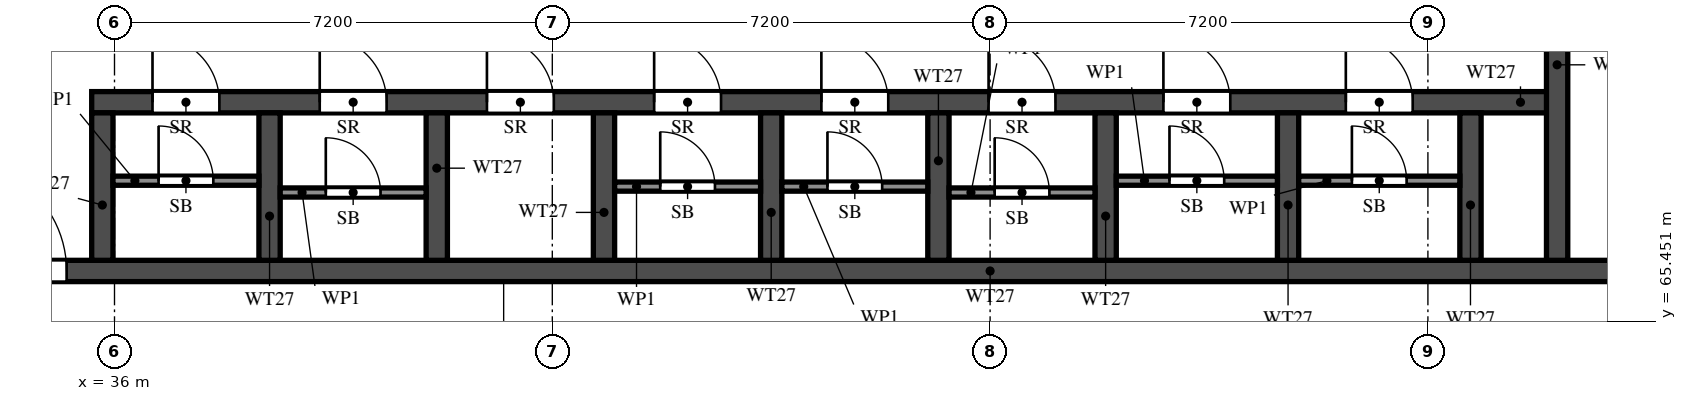
"""IFC4 building model, lengths in metres.
Left out: names, types, materials, properties, quantities, classifications, styles, units other than length and angle.
Written with IfcOpenShell. Run it as: python <this file> out.ifc"""

import sys

from ifc_helpers import new_model, si_unit, direction, frame, frame_2d, origin, place, context, subcontext, project, spatial, rectangle, extrude, element, fill, save


model = new_model("IFC4")
c1 = context("Model", 3, precision=1e-05, world=origin(), true_north=direction((0.0, 1.0)))
c2 = subcontext(c1, "Body", "Model", "MODEL_VIEW")
j1 = project(units=[si_unit("LENGTHUNIT", "METRE"), si_unit("PLANEANGLEUNIT", "RADIAN")], contexts=[c1])
p1 = place(None, origin())
s1 = spatial("IfcSite", under=j1, at=p1, CompositionType="ELEMENT")
p2 = place(p1, origin())
s2 = spatial("IfcBuilding", under=s1, at=p2, CompositionType="ELEMENT")
p3 = place(p2, frame((0.0, 0.0, 150.0)))
s3 = spatial("IfcBuildingStorey", under=s2, at=p3, CompositionType="ELEMENT", Elevation=150.0)
p4 = place(p3, frame((29.7, 66.275, 0.0), z_axis=(0.0, 0.0, 1.0), x_axis=(1.0, 0.0, 0.0)))
e1 = element("IfcWall", 1, at=p4, inside=s3, PredefinedType="SHEAR", context=c2, shape_type="SweptSolid", body=[
    extrude(rectangle(XDim=41.4, YDim=0.35, at=frame_2d((20.7, 0.0))), origin(), (0.0, 0.0, 1.0), 3.2),
])
p5 = place(p4, frame((0.925, 0.0, 0.0)))
e2 = element("IfcOpeningElement", 2, at=p5, cuts=e1, PredefinedType="OPENING", context=c2, shape_type="SweptSolid", body=[
    extrude(rectangle(XDim=1.1, YDim=2.1, at=frame_2d((0.55, 1.05))), frame((0.0, 0.185, 0.0), z_axis=(0.0, -1.0, 0.0), x_axis=(1.0, 0.0, 0.0)), (0.0, 0.0, 1.0), 0.37),
])
p6 = place(p4, frame((3.712, 0.0, 0.0)))
e3 = element("IfcOpeningElement", 3, at=p6, cuts=e1, PredefinedType="OPENING", context=c2, shape_type="SweptSolid", body=[
    extrude(rectangle(XDim=1.8, YDim=2.1, at=frame_2d((0.9, 1.05))), frame((0.0, 0.185, 0.0), z_axis=(0.0, -1.0, 0.0), x_axis=(1.0, 0.0, 0.0)), (0.0, 0.0, 1.0), 0.37),
])
p7 = place(p3, frame((35.625, 69.05, 0.0), z_axis=(0.0, 0.0, 1.0), x_axis=(1.0, 0.0, 0.0)))
e4 = element("IfcWall", 4, at=p7, inside=s3, PredefinedType="SHEAR", context=c2, shape_type="SweptSolid", body=[
    extrude(rectangle(XDim=24.1, YDim=0.35, at=frame_2d((12.05, 0.0))), origin(), (0.0, 0.0, 1.0), 3.2),
])
p8 = place(p7, frame((1.0, 0.0, 0.0)))
e5 = element("IfcOpeningElement", 5, at=p8, cuts=e4, PredefinedType="OPENING", context=c2, shape_type="SweptSolid", body=[
    extrude(rectangle(XDim=1.1, YDim=2.1, at=frame_2d((0.55, 1.05))), frame((0.0, 0.185, 0.0), z_axis=(0.0, -1.0, 0.0), x_axis=(1.0, 0.0, 0.0)), (0.0, 0.0, 1.0), 0.37),
])
p9 = place(p7, frame((3.75, 0.0, 0.0)))
e6 = element("IfcOpeningElement", 6, at=p9, cuts=e4, PredefinedType="OPENING", context=c2, shape_type="SweptSolid", body=[
    extrude(rectangle(XDim=1.1, YDim=2.1, at=frame_2d((0.55, 1.05))), frame((0.0, 0.185, 0.0), z_axis=(0.0, -1.0, 0.0), x_axis=(1.0, 0.0, 0.0)), (0.0, 0.0, 1.0), 0.37),
])
p10 = place(p7, frame((6.5, 0.0, 0.0)))
e7 = element("IfcOpeningElement", 7, at=p10, cuts=e4, PredefinedType="OPENING", context=c2, shape_type="SweptSolid", body=[
    extrude(rectangle(XDim=1.1, YDim=2.1, at=frame_2d((0.55, 1.05))), frame((0.0, 0.185, 0.0), z_axis=(0.0, -1.0, 0.0), x_axis=(1.0, 0.0, 0.0)), (0.0, 0.0, 1.0), 0.37),
])
p11 = place(p7, frame((9.25, 0.0, 0.0)))
e8 = element("IfcOpeningElement", 8, at=p11, cuts=e4, PredefinedType="OPENING", context=c2, shape_type="SweptSolid", body=[
    extrude(rectangle(XDim=1.1, YDim=2.1, at=frame_2d((0.55, 1.05))), frame((0.0, 0.185, 0.0), z_axis=(0.0, -1.0, 0.0), x_axis=(1.0, 0.0, 0.0)), (0.0, 0.0, 1.0), 0.37),
])
p12 = place(p7, frame((12.0, 0.0, 0.0)))
e9 = element("IfcOpeningElement", 9, at=p12, cuts=e4, PredefinedType="OPENING", context=c2, shape_type="SweptSolid", body=[
    extrude(rectangle(XDim=1.1, YDim=2.1, at=frame_2d((0.55, 1.05))), frame((0.0, 0.185, 0.0), z_axis=(0.0, -1.0, 0.0), x_axis=(1.0, 0.0, 0.0)), (0.0, 0.0, 1.0), 0.37),
])
p13 = place(p7, frame((14.75, 0.0, 0.0)))
e10 = element("IfcOpeningElement", 10, at=p13, cuts=e4, PredefinedType="OPENING", context=c2, shape_type="SweptSolid", body=[
    extrude(rectangle(XDim=1.1, YDim=2.1, at=frame_2d((0.55, 1.05))), frame((0.0, 0.185, 0.0), z_axis=(0.0, -1.0, 0.0), x_axis=(1.0, 0.0, 0.0)), (0.0, 0.0, 1.0), 0.37),
])
p14 = place(p7, frame((17.625, 0.0, 0.0)))
e11 = element("IfcOpeningElement", 11, at=p14, cuts=e4, PredefinedType="OPENING", context=c2, shape_type="SweptSolid", body=[
    extrude(rectangle(XDim=1.1, YDim=2.1, at=frame_2d((0.55, 1.05))), frame((0.0, 0.185, 0.0), z_axis=(0.0, -1.0, 0.0), x_axis=(1.0, 0.0, 0.0)), (0.0, 0.0, 1.0), 0.37),
])
p15 = place(p7, frame((20.625, 0.0, 0.0)))
e12 = element("IfcOpeningElement", 12, at=p15, cuts=e4, PredefinedType="OPENING", context=c2, shape_type="SweptSolid", body=[
    extrude(rectangle(XDim=1.1, YDim=2.1, at=frame_2d((0.55, 1.05))), frame((0.0, 0.185, 0.0), z_axis=(0.0, -1.0, 0.0), x_axis=(1.0, 0.0, 0.0)), (0.0, 0.0, 1.0), 0.37),
])
p16 = place(p3, frame((59.725, 66.45, 0.0), z_axis=(0.0, 0.0, 1.0), x_axis=(0.0, 1.0, 0.0)))
e13 = element("IfcWall", 13, at=p16, inside=s3, PredefinedType="SHEAR", context=c2, shape_type="SweptSolid", body=[
    extrude(rectangle(XDim=6.125, YDim=0.35, at=frame_2d((3.062, 0.0))), origin(), (0.0, 0.0, 1.0), 3.2),
])
p17 = place(p16, frame((3.85, 0.0, 0.0)))
e14 = element("IfcOpeningElement", 14, at=p17, cuts=e13, PredefinedType="OPENING", context=c2, shape_type="SweptSolid", body=[
    extrude(rectangle(XDim=1.2, YDim=2.1, at=frame_2d((0.6, 1.05))), frame((0.0, 0.185, 0.0), z_axis=(0.0, -1.0, 0.0), x_axis=(1.0, 0.0, 0.0)), (0.0, 0.0, 1.0), 0.37),
])
for number, where, z_axis, x_axis in (
    (15, (35.8, 66.45, 0.0), (0.0, 0.0, 1.0), (0.0, 1.0, 0.0)),
    (16, (38.55, 66.45, 0.0), (0.0, 0.0, 1.0), (0.0, 1.0, 0.0)),
    (17, (41.3, 66.45, 0.0), (0.0, 0.0, 1.0), (0.0, 1.0, 0.0)),
    (18, (44.05, 66.45, 0.0), (0.0, 0.0, 1.0), (0.0, 1.0, 0.0)),
    (19, (46.8, 66.45, 0.0), (0.0, 0.0, 1.0), (0.0, 1.0, 0.0)),
    (20, (49.55, 66.45, 0.0), (0.0, 0.0, 1.0), (0.0, 1.0, 0.0)),
    (21, (52.3, 66.45, 0.0), (0.0, 0.0, 1.0), (0.0, 1.0, 0.0)),
    (22, (55.3, 66.45, 0.0), (0.0, 0.0, 1.0), (0.0, 1.0, 0.0)),
    (23, (58.3, 66.45, 0.0), (0.0, 0.0, 1.0), (0.0, 1.0, 0.0)),
):
    element("IfcWall", number, at=place(p3, frame(where, z_axis=z_axis, x_axis=x_axis)), inside=s3, PredefinedType="SHEAR", context=c2, shape_type="SweptSolid", body=[
        extrude(rectangle(XDim=2.425, YDim=0.35, at=frame_2d((1.212, 0.0))), origin(), (0.0, 0.0, 1.0), 3.2),
    ])
p18 = place(p3, frame((35.975, 67.76, 0.0), z_axis=(0.0, 0.0, 1.0), x_axis=(1.0, 0.0, 0.0)))
e24 = element("IfcWall", 24, at=p18, inside=s3, PredefinedType="PARTITIONING", context=c2, shape_type="SweptSolid", body=[
    extrude(rectangle(XDim=2.4, YDim=0.15, at=frame_2d((1.2, 0.0))), origin(), (0.0, 0.0, 1.0), 3.2),
])
p19 = place(p18, frame((0.75, 0.0, 0.0)))
e25 = element("IfcOpeningElement", 25, at=p19, cuts=e24, PredefinedType="OPENING", context=c2, shape_type="SweptSolid", body=[
    extrude(rectangle(XDim=0.9, YDim=2.1, at=frame_2d((0.45, 1.05))), frame((0.0, 0.085, 0.0), z_axis=(0.0, -1.0, 0.0), x_axis=(1.0, 0.0, 0.0)), (0.0, 0.0, 1.0), 0.17),
])
p20 = place(p3, frame((38.725, 67.565, 0.0), z_axis=(0.0, 0.0, 1.0), x_axis=(1.0, 0.0, 0.0)))
e26 = element("IfcWall", 26, at=p20, inside=s3, PredefinedType="PARTITIONING", context=c2, shape_type="SweptSolid", body=[
    extrude(rectangle(XDim=2.4, YDim=0.15, at=frame_2d((1.2, 0.0))), origin(), (0.0, 0.0, 1.0), 3.2),
])
p21 = place(p20, frame((0.75, 0.0, 0.0)))
e27 = element("IfcOpeningElement", 27, at=p21, cuts=e26, PredefinedType="OPENING", context=c2, shape_type="SweptSolid", body=[
    extrude(rectangle(XDim=0.9, YDim=2.1, at=frame_2d((0.45, 1.05))), frame((0.0, 0.085, 0.0), z_axis=(0.0, -1.0, 0.0), x_axis=(1.0, 0.0, 0.0)), (0.0, 0.0, 1.0), 0.17),
])
p22 = place(p3, frame((44.225, 67.663, 0.0), z_axis=(0.0, 0.0, 1.0), x_axis=(1.0, 0.0, 0.0)))
e28 = element("IfcWall", 28, at=p22, inside=s3, PredefinedType="PARTITIONING", context=c2, shape_type="SweptSolid", body=[
    extrude(rectangle(XDim=2.4, YDim=0.15, at=frame_2d((1.2, 0.0))), origin(), (0.0, 0.0, 1.0), 3.2),
])
p23 = place(p22, frame((0.75, 0.0, 0.0)))
e29 = element("IfcOpeningElement", 29, at=p23, cuts=e28, PredefinedType="OPENING", context=c2, shape_type="SweptSolid", body=[
    extrude(rectangle(XDim=0.9, YDim=2.1, at=frame_2d((0.45, 1.05))), frame((0.0, 0.085, 0.0), z_axis=(0.0, -1.0, 0.0), x_axis=(1.0, 0.0, 0.0)), (0.0, 0.0, 1.0), 0.17),
])
p24 = place(p3, frame((46.975, 67.663, 0.0), z_axis=(0.0, 0.0, 1.0), x_axis=(1.0, 0.0, 0.0)))
e30 = element("IfcWall", 30, at=p24, inside=s3, PredefinedType="PARTITIONING", context=c2, shape_type="SweptSolid", body=[
    extrude(rectangle(XDim=2.4, YDim=0.15, at=frame_2d((1.2, 0.0))), origin(), (0.0, 0.0, 1.0), 3.2),
])
p25 = place(p24, frame((0.75, 0.0, 0.0)))
e31 = element("IfcOpeningElement", 31, at=p25, cuts=e30, PredefinedType="OPENING", context=c2, shape_type="SweptSolid", body=[
    extrude(rectangle(XDim=0.9, YDim=2.1, at=frame_2d((0.45, 1.05))), frame((0.0, 0.085, 0.0), z_axis=(0.0, -1.0, 0.0), x_axis=(1.0, 0.0, 0.0)), (0.0, 0.0, 1.0), 0.17),
])
p26 = place(p3, frame((49.725, 67.565, 0.0), z_axis=(0.0, 0.0, 1.0), x_axis=(1.0, 0.0, 0.0)))
e32 = element("IfcWall", 32, at=p26, inside=s3, PredefinedType="PARTITIONING", context=c2, shape_type="SweptSolid", body=[
    extrude(rectangle(XDim=2.4, YDim=0.15, at=frame_2d((1.2, 0.0))), origin(), (0.0, 0.0, 1.0), 3.2),
])
p27 = place(p26, frame((0.75, 0.0, 0.0)))
e33 = element("IfcOpeningElement", 33, at=p27, cuts=e32, PredefinedType="OPENING", context=c2, shape_type="SweptSolid", body=[
    extrude(rectangle(XDim=0.9, YDim=2.1, at=frame_2d((0.45, 1.05))), frame((0.0, 0.085, 0.0), z_axis=(0.0, -1.0, 0.0), x_axis=(1.0, 0.0, 0.0)), (0.0, 0.0, 1.0), 0.17),
])
p28 = place(p3, frame((52.475, 67.76, 0.0), z_axis=(0.0, 0.0, 1.0), x_axis=(1.0, 0.0, 0.0)))
e34 = element("IfcWall", 34, at=p28, inside=s3, PredefinedType="PARTITIONING", context=c2, shape_type="SweptSolid", body=[
    extrude(rectangle(XDim=2.65, YDim=0.15, at=frame_2d((1.325, 0.0))), origin(), (0.0, 0.0, 1.0), 3.2),
])
p29 = place(p28, frame((0.875, 0.0, 0.0)))
e35 = element("IfcOpeningElement", 35, at=p29, cuts=e34, PredefinedType="OPENING", context=c2, shape_type="SweptSolid", body=[
    extrude(rectangle(XDim=0.9, YDim=2.1, at=frame_2d((0.45, 1.05))), frame((0.0, 0.085, 0.0), z_axis=(0.0, -1.0, 0.0), x_axis=(1.0, 0.0, 0.0)), (0.0, 0.0, 1.0), 0.17),
])
p30 = place(p3, frame((55.475, 67.76, 0.0), z_axis=(0.0, 0.0, 1.0), x_axis=(1.0, 0.0, 0.0)))
e36 = element("IfcWall", 36, at=p30, inside=s3, PredefinedType="PARTITIONING", context=c2, shape_type="SweptSolid", body=[
    extrude(rectangle(XDim=2.65, YDim=0.15, at=frame_2d((1.325, 0.0))), origin(), (0.0, 0.0, 1.0), 3.2),
])
p31 = place(p30, frame((0.875, 0.0, 0.0)))
e37 = element("IfcOpeningElement", 37, at=p31, cuts=e36, PredefinedType="OPENING", context=c2, shape_type="SweptSolid", body=[
    extrude(rectangle(XDim=0.9, YDim=2.1, at=frame_2d((0.45, 1.05))), frame((0.0, 0.085, 0.0), z_axis=(0.0, -1.0, 0.0), x_axis=(1.0, 0.0, 0.0)), (0.0, 0.0, 1.0), 0.17),
])
p32 = place(p6, origin())
e38 = element("IfcDoor", 38, at=p32, inside=s3, OperationType="DOUBLE_DOOR_SINGLE_SWING", PredefinedType="DOOR", context=c2, shape_type="SweptSolid", body=[
    extrude(rectangle(XDim=1.8, YDim=2.1, at=frame_2d((0.9, 1.05))), frame((0.0, 0.025, 0.0), z_axis=(0.0, -1.0, 0.0), x_axis=(1.0, 0.0, 0.0)), (0.0, 0.0, 1.0), 0.05),
])
fill(e3, e38)
p33 = place(p8, origin())
e39 = element("IfcDoor", 39, at=p33, inside=s3, OperationType="SINGLE_SWING_RIGHT", PredefinedType="DOOR", context=c2, shape_type="SweptSolid", body=[
    extrude(rectangle(XDim=1.1, YDim=2.1, at=frame_2d((0.55, 1.05))), frame((0.0, 0.025, 0.0), z_axis=(0.0, -1.0, 0.0), x_axis=(1.0, 0.0, 0.0)), (0.0, 0.0, 1.0), 0.05),
])
fill(e5, e39)
p34 = place(p19, origin())
e40 = element("IfcDoor", 40, at=p34, inside=s3, OperationType="SINGLE_SWING_LEFT", PredefinedType="DOOR", context=c2, shape_type="SweptSolid", body=[
    extrude(rectangle(XDim=0.9, YDim=2.1, at=frame_2d((0.45, 1.05))), frame((0.0, 0.025, 0.0), z_axis=(0.0, -1.0, 0.0), x_axis=(1.0, 0.0, 0.0)), (0.0, 0.0, 1.0), 0.05),
])
fill(e25, e40)
p35 = place(p9, origin())
e41 = element("IfcDoor", 41, at=p35, inside=s3, OperationType="SINGLE_SWING_LEFT", PredefinedType="DOOR", context=c2, shape_type="SweptSolid", body=[
    extrude(rectangle(XDim=1.1, YDim=2.1, at=frame_2d((0.55, 1.05))), frame((0.0, 0.025, 0.0), z_axis=(0.0, -1.0, 0.0), x_axis=(1.0, 0.0, 0.0)), (0.0, 0.0, 1.0), 0.05),
])
fill(e6, e41)
p36 = place(p21, origin())
e42 = element("IfcDoor", 42, at=p36, inside=s3, OperationType="SINGLE_SWING_LEFT", PredefinedType="DOOR", context=c2, shape_type="SweptSolid", body=[
    extrude(rectangle(XDim=0.9, YDim=2.1, at=frame_2d((0.45, 1.05))), frame((0.0, 0.025, 0.0), z_axis=(0.0, -1.0, 0.0), x_axis=(1.0, 0.0, 0.0)), (0.0, 0.0, 1.0), 0.05),
])
fill(e27, e42)
p37 = place(p10, origin())
e43 = element("IfcDoor", 43, at=p37, inside=s3, OperationType="SINGLE_SWING_RIGHT", PredefinedType="DOOR", context=c2, shape_type="SweptSolid", body=[
    extrude(rectangle(XDim=1.1, YDim=2.1, at=frame_2d((0.55, 1.05))), frame((0.0, 0.025, 0.0), z_axis=(0.0, -1.0, 0.0), x_axis=(1.0, 0.0, 0.0)), (0.0, 0.0, 1.0), 0.05),
])
fill(e7, e43)
p38 = place(p11, origin())
e44 = element("IfcDoor", 44, at=p38, inside=s3, OperationType="SINGLE_SWING_LEFT", PredefinedType="DOOR", context=c2, shape_type="SweptSolid", body=[
    extrude(rectangle(XDim=1.1, YDim=2.1, at=frame_2d((0.55, 1.05))), frame((0.0, 0.025, 0.0), z_axis=(0.0, -1.0, 0.0), x_axis=(1.0, 0.0, 0.0)), (0.0, 0.0, 1.0), 0.05),
])
fill(e8, e44)
p39 = place(p23, origin())
e45 = element("IfcDoor", 45, at=p39, inside=s3, OperationType="SINGLE_SWING_LEFT", PredefinedType="DOOR", context=c2, shape_type="SweptSolid", body=[
    extrude(rectangle(XDim=0.9, YDim=2.1, at=frame_2d((0.45, 1.05))), frame((0.0, 0.025, 0.0), z_axis=(0.0, -1.0, 0.0), x_axis=(1.0, 0.0, 0.0)), (0.0, 0.0, 1.0), 0.05),
])
fill(e29, e45)
p40 = place(p12, origin())
e46 = element("IfcDoor", 46, at=p40, inside=s3, OperationType="SINGLE_SWING_RIGHT", PredefinedType="DOOR", context=c2, shape_type="SweptSolid", body=[
    extrude(rectangle(XDim=1.1, YDim=2.1, at=frame_2d((0.55, 1.05))), frame((0.0, 0.025, 0.0), z_axis=(0.0, -1.0, 0.0), x_axis=(1.0, 0.0, 0.0)), (0.0, 0.0, 1.0), 0.05),
])
fill(e9, e46)
p41 = place(p25, origin())
e47 = element("IfcDoor", 47, at=p41, inside=s3, OperationType="SINGLE_SWING_RIGHT", PredefinedType="DOOR", context=c2, shape_type="SweptSolid", body=[
    extrude(rectangle(XDim=0.9, YDim=2.1, at=frame_2d((0.45, 1.05))), frame((0.0, 0.025, 0.0), z_axis=(0.0, -1.0, 0.0), x_axis=(1.0, 0.0, 0.0)), (0.0, 0.0, 1.0), 0.05),
])
fill(e31, e47)
p42 = place(p13, origin())
e48 = element("IfcDoor", 48, at=p42, inside=s3, OperationType="SINGLE_SWING_LEFT", PredefinedType="DOOR", context=c2, shape_type="SweptSolid", body=[
    extrude(rectangle(XDim=1.1, YDim=2.1, at=frame_2d((0.55, 1.05))), frame((0.0, 0.025, 0.0), z_axis=(0.0, -1.0, 0.0), x_axis=(1.0, 0.0, 0.0)), (0.0, 0.0, 1.0), 0.05),
])
fill(e10, e48)
p43 = place(p27, origin())
e49 = element("IfcDoor", 49, at=p43, inside=s3, OperationType="SINGLE_SWING_LEFT", PredefinedType="DOOR", context=c2, shape_type="SweptSolid", body=[
    extrude(rectangle(XDim=0.9, YDim=2.1, at=frame_2d((0.45, 1.05))), frame((0.0, 0.025, 0.0), z_axis=(0.0, -1.0, 0.0), x_axis=(1.0, 0.0, 0.0)), (0.0, 0.0, 1.0), 0.05),
])
fill(e33, e49)
p44 = place(p14, origin())
e50 = element("IfcDoor", 50, at=p44, inside=s3, OperationType="SINGLE_SWING_RIGHT", PredefinedType="DOOR", context=c2, shape_type="SweptSolid", body=[
    extrude(rectangle(XDim=1.1, YDim=2.1, at=frame_2d((0.55, 1.05))), frame((0.0, 0.025, 0.0), z_axis=(0.0, -1.0, 0.0), x_axis=(1.0, 0.0, 0.0)), (0.0, 0.0, 1.0), 0.05),
])
fill(e11, e50)
p45 = place(p29, origin())
e51 = element("IfcDoor", 51, at=p45, inside=s3, OperationType="SINGLE_SWING_LEFT", PredefinedType="DOOR", context=c2, shape_type="SweptSolid", body=[
    extrude(rectangle(XDim=0.9, YDim=2.1, at=frame_2d((0.45, 1.05))), frame((0.0, 0.025, 0.0), z_axis=(0.0, -1.0, 0.0), x_axis=(1.0, 0.0, 0.0)), (0.0, 0.0, 1.0), 0.05),
])
fill(e35, e51)
p46 = place(p15, origin())
e52 = element("IfcDoor", 52, at=p46, inside=s3, OperationType="SINGLE_SWING_RIGHT", PredefinedType="DOOR", context=c2, shape_type="SweptSolid", body=[
    extrude(rectangle(XDim=1.1, YDim=2.1, at=frame_2d((0.55, 1.05))), frame((0.0, 0.025, 0.0), z_axis=(0.0, -1.0, 0.0), x_axis=(1.0, 0.0, 0.0)), (0.0, 0.0, 1.0), 0.05),
])
fill(e12, e52)
p47 = place(p31, origin())
e53 = element("IfcDoor", 53, at=p47, inside=s3, OperationType="SINGLE_SWING_LEFT", PredefinedType="DOOR", context=c2, shape_type="SweptSolid", body=[
    extrude(rectangle(XDim=0.9, YDim=2.1, at=frame_2d((0.45, 1.05))), frame((0.0, 0.025, 0.0), z_axis=(0.0, -1.0, 0.0), x_axis=(1.0, 0.0, 0.0)), (0.0, 0.0, 1.0), 0.05),
])
fill(e37, e53)
save(model, sys.argv[1])
